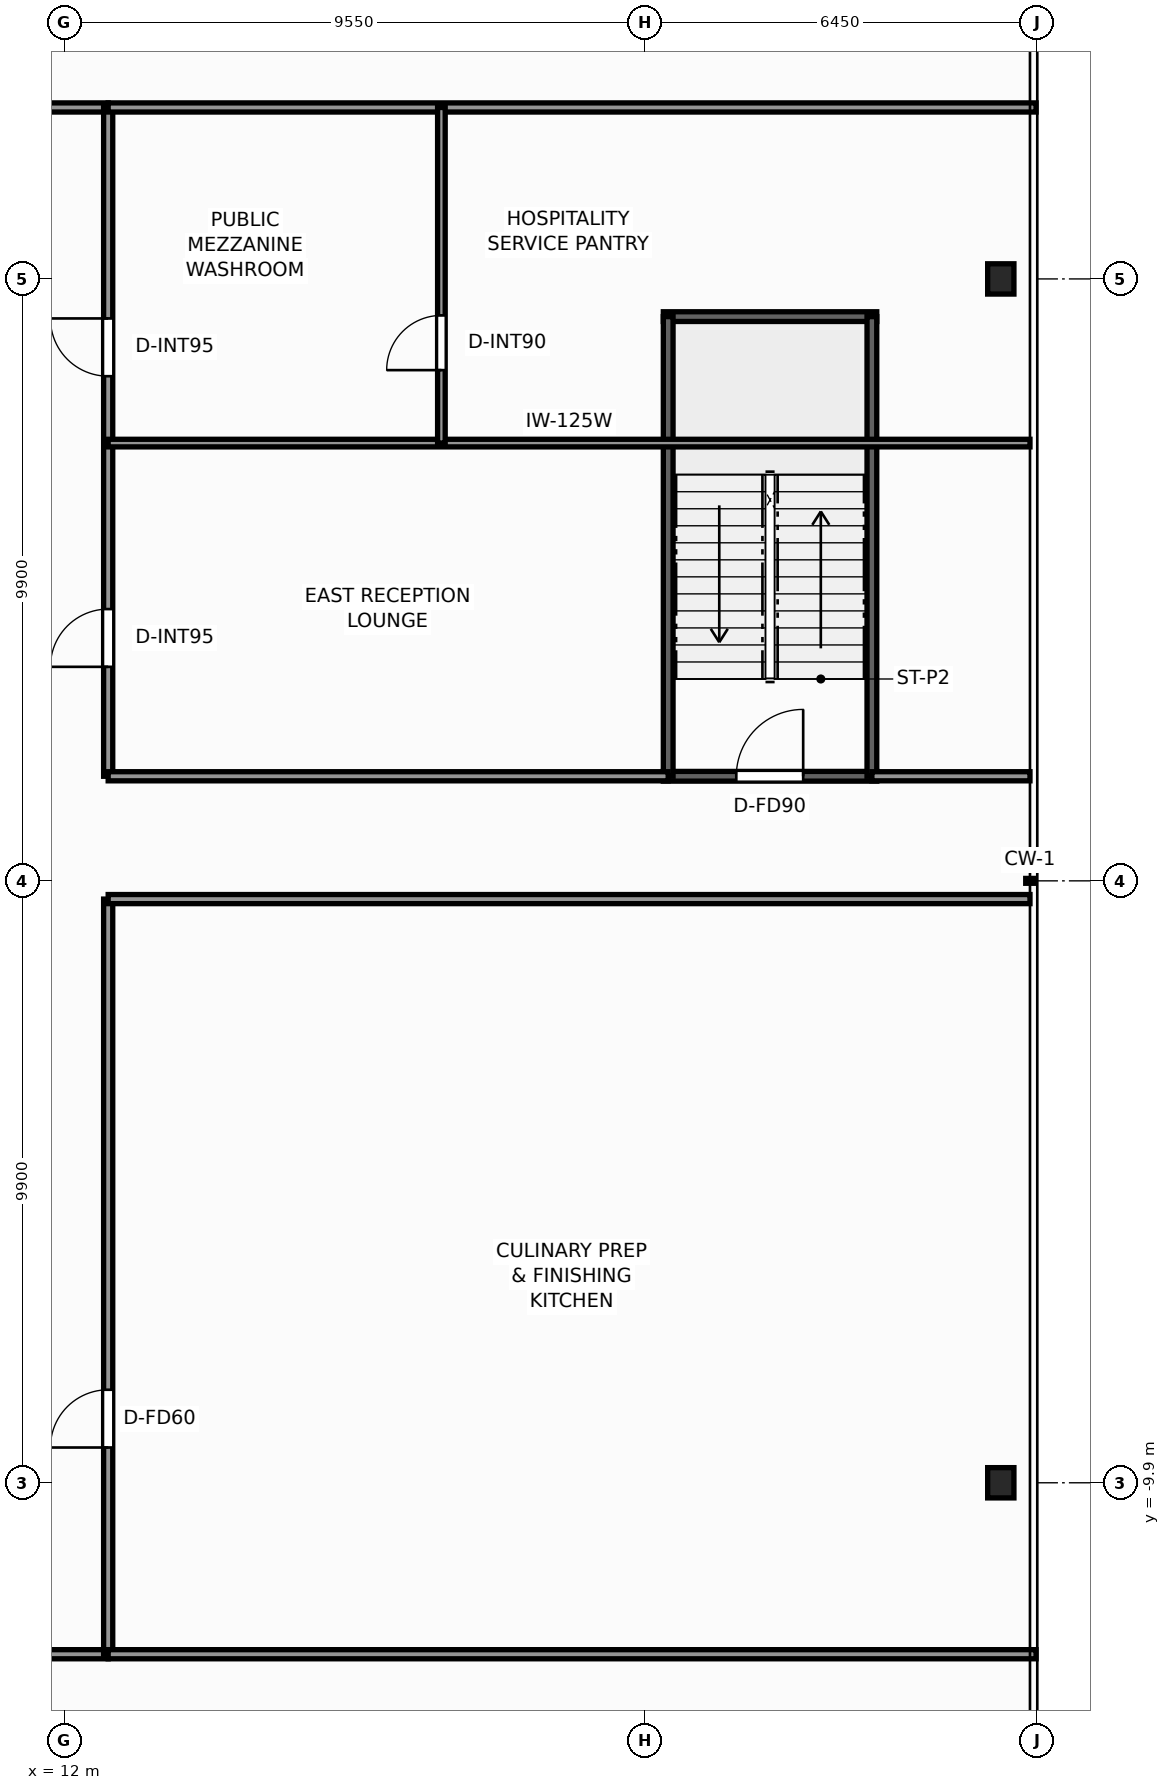
"""IFC4 building model, lengths in metres.
Left out: names, types, materials, properties, quantities, classifications, styles, units other than length and angle.
Written with IfcOpenShell. Run it as: python <this file> out.ifc"""

import sys

from ifc_helpers import new_model, si_unit, direction, frame, frame_2d, origin, origin_2d, place, context, subcontext, project, spatial, rectangle, i_section, extrude, element, fill, save


model = new_model("IFC4")
c1 = context("Model", 3, precision=1e-05, world=origin(), true_north=direction((0.0, 1.0)))
c2 = subcontext(c1, "Body", "Model", "MODEL_VIEW")
j1 = project(units=[si_unit("LENGTHUNIT", "METRE"), si_unit("PLANEANGLEUNIT", "RADIAN")], contexts=[c1])
p1 = place(None, origin())
s1 = spatial("IfcSite", under=j1, at=p1, CompositionType="ELEMENT")
p2 = place(p1, origin())
s2 = spatial("IfcBuilding", under=s1, at=p2, CompositionType="ELEMENT")
p3 = place(p2, frame((0.0, 0.0, 5.5)))
s3 = spatial("IfcBuildingStorey", under=s2, at=p3, CompositionType="ELEMENT", Elevation=5.5)
for number, where, z_axis, x_axis in (
    (1, (27.4, -9.9, 0.0), (0.0, 0.0, 1.0), (1.0, 0.0, 0.0)),
    (2, (27.4, 9.9, 0.0), (0.0, 0.0, 1.0), (1.0, 0.0, 0.0)),
):
    element("IfcColumn", number, at=place(p3, frame(where, z_axis=z_axis, x_axis=x_axis)), inside=s3, PredefinedType="COLUMN", context=c2, shape_type="SweptSolid", body=[
        extrude(i_section(OverallWidth=0.432, OverallDepth=0.498, WebThickness=0.056, FlangeThickness=0.089, FilletRadius=0.025, at=origin_2d()), origin(), (0.0, 0.0, 1.0), 4.5),
    ])
p4 = place(p3, frame((21.85, 1.72, 0.0), z_axis=(0.0, 0.0, 1.0), x_axis=(1.0, 0.0, 0.0)))
e3 = element("IfcWall", 3, at=p4, inside=s3, PredefinedType="SHEAR", context=c2, shape_type="SweptSolid", body=[
    extrude(rectangle(XDim=3.51, YDim=0.16, at=frame_2d((1.755, 0.0))), origin(), (0.0, 0.0, 1.0), 4.5),
])
p5 = place(p4, frame((1.2, 0.0, 0.0)))
e4 = element("IfcOpeningElement", 4, at=p5, cuts=e3, PredefinedType="OPENING", context=c2, shape_type="SweptSolid", body=[
    extrude(rectangle(XDim=1.1, YDim=2.2, at=frame_2d((0.55, 1.1))), frame((0.0, 0.09, 0.0), z_axis=(0.0, -1.0, 0.0), x_axis=(1.0, 0.0, 0.0)), (0.0, 0.0, 1.0), 0.18),
])
p6 = place(p3, frame((21.85, 9.28, 0.0), z_axis=(0.0, 0.0, 1.0), x_axis=(1.0, 0.0, 0.0)))
e5 = element("IfcWall", 5, at=p6, inside=s3, PredefinedType="SHEAR", context=c2, shape_type="SweptSolid", body=[
    extrude(rectangle(XDim=3.51, YDim=0.16, at=frame_2d((1.755, 0.0))), origin(), (0.0, 0.0, 1.0), 4.5),
])
for number, where, z_axis, x_axis in (
    (6, (21.93, 1.72, 0.0), (0.0, 0.0, 1.0), (0.0, 1.0, 0.0)),
    (7, (25.28, 1.72, 0.0), (0.0, 0.0, 1.0), (0.0, 1.0, 0.0)),
):
    element("IfcWall", number, at=place(p3, frame(where, z_axis=z_axis, x_axis=x_axis)), inside=s3, PredefinedType="SHEAR", context=c2, shape_type="SweptSolid", body=[
        extrude(rectangle(XDim=7.56, YDim=0.16, at=frame_2d((3.78, 0.0))), origin(), (0.0, 0.0, 1.0), 4.5),
    ])
p7 = place(p3, frame((-12.72, -12.72, 0.0), z_axis=(0.0, 0.0, 1.0), x_axis=(1.0, 0.0, 0.0)))
e8 = element("IfcWall", 8, at=p7, inside=s3, PredefinedType="PARTITIONING", context=c2, shape_type="SweptSolid", body=[
    extrude(rectangle(XDim=25.44, YDim=0.15, at=frame_2d((12.72, 0.0))), origin(), (0.0, 0.0, 1.0), 3.194),
])
p8 = place(p7, frame((3.6, 0.0, 0.0)))
e9 = element("IfcOpeningElement", 9, at=p8, cuts=e8, PredefinedType="OPENING", context=c2, shape_type="SweptSolid", body=[
    extrude(rectangle(XDim=1.6, YDim=2.3, at=frame_2d((0.8, 1.15))), frame((0.0, 0.085, 0.0), z_axis=(0.0, -1.0, 0.0), x_axis=(1.0, 0.0, 0.0)), (0.0, 0.0, 1.0), 0.17),
])
p9 = place(p7, frame((11.57, 0.0, 0.0)))
e10 = element("IfcOpeningElement", 10, at=p9, cuts=e8, PredefinedType="OPENING", context=c2, shape_type="SweptSolid", body=[
    extrude(rectangle(XDim=1.2, YDim=2.2, at=frame_2d((0.6, 1.1))), frame((0.0, 0.085, 0.0), z_axis=(0.0, -1.0, 0.0), x_axis=(1.0, 0.0, 0.0)), (0.0, 0.0, 1.0), 0.17),
])
p10 = place(p3, frame((-12.72, 12.72, 0.0), z_axis=(0.0, 0.0, 1.0), x_axis=(1.0, 0.0, 0.0)))
e11 = element("IfcWall", 11, at=p10, inside=s3, PredefinedType="PARTITIONING", context=c2, shape_type="SweptSolid", body=[
    extrude(rectangle(XDim=25.44, YDim=0.15, at=frame_2d((12.72, 0.0))), origin(), (0.0, 0.0, 1.0), 3.194),
])
p11 = place(p10, frame((1.8, 0.0, 0.0)))
e12 = element("IfcOpeningElement", 12, at=p11, cuts=e11, PredefinedType="OPENING", context=c2, shape_type="SweptSolid", body=[
    extrude(rectangle(XDim=0.95, YDim=2.06, at=frame_2d((0.475, 1.03))), frame((0.0, 0.085, 0.0), z_axis=(0.0, -1.0, 0.0), x_axis=(1.0, 0.0, 0.0)), (0.0, 0.0, 1.0), 0.17),
])
p12 = place(p10, frame((10.5, 0.0, 0.0)))
e13 = element("IfcOpeningElement", 13, at=p12, cuts=e11, PredefinedType="OPENING", context=c2, shape_type="SweptSolid", body=[
    extrude(rectangle(XDim=1.6, YDim=2.3, at=frame_2d((0.8, 1.15))), frame((0.0, 0.085, 0.0), z_axis=(0.0, -1.0, 0.0), x_axis=(1.0, 0.0, 0.0)), (0.0, 0.0, 1.0), 0.17),
])
p13 = place(p3, frame((12.72, -12.72, 0.0), z_axis=(0.0, 0.0, 1.0), x_axis=(0.0, 1.0, 0.0)))
e14 = element("IfcWall", 14, at=p13, inside=s3, PredefinedType="PARTITIONING", context=c2, shape_type="SweptSolid", body=[
    extrude(rectangle(XDim=12.42, YDim=0.15, at=frame_2d((6.21, 0.0))), origin(), (0.0, 0.0, 1.0), 3.194),
])
p14 = place(p13, frame((3.4, 0.0, 0.0)))
e15 = element("IfcOpeningElement", 15, at=p14, cuts=e14, PredefinedType="OPENING", context=c2, shape_type="SweptSolid", body=[
    extrude(rectangle(XDim=0.95, YDim=2.06, at=frame_2d((0.475, 1.03))), frame((0.0, 0.085, 0.0), z_axis=(0.0, -1.0, 0.0), x_axis=(1.0, 0.0, 0.0)), (0.0, 0.0, 1.0), 0.17),
])
p15 = place(p3, frame((12.72, 1.72, 0.0), z_axis=(0.0, 0.0, 1.0), x_axis=(0.0, 1.0, 0.0)))
e16 = element("IfcWall", 16, at=p15, inside=s3, PredefinedType="PARTITIONING", context=c2, shape_type="SweptSolid", body=[
    extrude(rectangle(XDim=11.0, YDim=0.15, at=frame_2d((5.5, 0.0))), origin(), (0.0, 0.0, 1.0), 3.194),
])
p16 = place(p15, frame((6.58, 0.0, 0.0)))
e17 = element("IfcOpeningElement", 17, at=p16, cuts=e16, PredefinedType="OPENING", context=c2, shape_type="SweptSolid", body=[
    extrude(rectangle(XDim=0.95, YDim=2.06, at=frame_2d((0.475, 1.03))), frame((0.0, 0.085, 0.0), z_axis=(0.0, -1.0, 0.0), x_axis=(1.0, 0.0, 0.0)), (0.0, 0.0, 1.0), 0.17),
])
p17 = place(p15, frame((1.8, 0.0, 0.0)))
e18 = element("IfcOpeningElement", 18, at=p17, cuts=e16, PredefinedType="OPENING", context=c2, shape_type="SweptSolid", body=[
    extrude(rectangle(XDim=0.95, YDim=2.06, at=frame_2d((0.475, 1.03))), frame((0.0, 0.085, 0.0), z_axis=(0.0, -1.0, 0.0), x_axis=(1.0, 0.0, 0.0)), (0.0, 0.0, 1.0), 0.17),
])
p18 = place(p3, frame((12.72, -0.3, 0.0), z_axis=(0.0, 0.0, 1.0), x_axis=(1.0, 0.0, 0.0)))
e19 = element("IfcWall", 19, at=p18, inside=s3, PredefinedType="PARTITIONING", context=c2, shape_type="SweptSolid", body=[
    extrude(rectangle(XDim=15.16, YDim=0.15, at=frame_2d((7.58, 0.0))), origin(), (0.0, 0.0, 1.0), 3.589),
])
p19 = place(p3, frame((12.72, 1.72, 0.0), z_axis=(0.0, 0.0, 1.0), x_axis=(1.0, 0.0, 0.0)))
e20 = element("IfcWall", 20, at=p19, inside=s3, PredefinedType="PARTITIONING", context=c2, shape_type="SweptSolid", body=[
    extrude(rectangle(XDim=9.21, YDim=0.15, at=frame_2d((4.605, 0.0))), origin(), (0.0, 0.0, 1.0), 4.22),
])
p20 = place(p3, frame((25.28, 1.72, 0.0), z_axis=(0.0, 0.0, 1.0), x_axis=(1.0, 0.0, 0.0)))
e21 = element("IfcWall", 21, at=p20, inside=s3, PredefinedType="PARTITIONING", context=c2, shape_type="SweptSolid", body=[
    extrude(rectangle(XDim=2.6, YDim=0.15, at=frame_2d((1.3, 0.0))), origin(), (0.0, 0.0, 1.0), 3.589),
])
for number, where, z_axis, x_axis in (
    (22, (12.72, -12.72, 0.0), (0.0, 0.0, 1.0), (1.0, 0.0, 0.0)),
    (23, (12.72, 12.72, 0.0), (0.0, 0.0, 1.0), (1.0, 0.0, 0.0)),
):
    element("IfcWall", number, at=place(p3, frame(where, z_axis=z_axis, x_axis=x_axis)), inside=s3, PredefinedType="PARTITIONING", context=c2, shape_type="SweptSolid", body=[
        extrude(rectangle(XDim=15.26, YDim=0.15, at=frame_2d((7.63, 0.0))), origin(), (0.0, 0.0, 1.0), 3.589),
    ])
p21 = place(p3, frame((12.72, 7.2, 0.0), z_axis=(0.0, 0.0, 1.0), x_axis=(1.0, 0.0, 0.0)))
e24 = element("IfcWall", 24, at=p21, inside=s3, PredefinedType="PARTITIONING", context=c2, shape_type="SweptSolid", body=[
    extrude(rectangle(XDim=15.16, YDim=0.125, at=frame_2d((7.58, 0.0))), origin(), (0.0, 0.0, 1.0), 3.589),
])
p22 = place(p3, frame((18.2, 7.2, 0.0), z_axis=(0.0, 0.0, 1.0), x_axis=(0.0, 1.0, 0.0)))
e25 = element("IfcWall", 25, at=p22, inside=s3, PredefinedType="PARTITIONING", context=c2, shape_type="SweptSolid", body=[
    extrude(rectangle(XDim=5.52, YDim=0.125, at=frame_2d((2.76, 0.0))), origin(), (0.0, 0.0, 1.0), 3.194),
])
p23 = place(p22, frame((1.2, 0.0, 0.0)))
e26 = element("IfcOpeningElement", 26, at=p23, cuts=e25, PredefinedType="OPENING", context=c2, shape_type="SweptSolid", body=[
    extrude(rectangle(XDim=0.9, YDim=2.06, at=frame_2d((0.45, 1.03))), frame((0.0, 0.073, 0.0), z_axis=(0.0, -1.0, 0.0), x_axis=(1.0, 0.0, 0.0)), (0.0, 0.0, 1.0), 0.145),
])
p24 = place(p5, origin())
e27 = element("IfcDoor", 27, at=p24, inside=s3, OperationType="SINGLE_SWING_RIGHT", PredefinedType="DOOR", context=c2, shape_type="SweptSolid", body=[
    extrude(rectangle(XDim=1.1, YDim=2.2, at=frame_2d((0.55, 1.1))), frame((0.0, 0.025, 0.0), z_axis=(0.0, -1.0, 0.0), x_axis=(1.0, 0.0, 0.0)), (0.0, 0.0, 1.0), 0.05),
])
fill(e4, e27)
p25 = place(p14, origin())
e28 = element("IfcDoor", 28, at=p25, inside=s3, OperationType="SINGLE_SWING_LEFT", PredefinedType="DOOR", context=c2, shape_type="SweptSolid", body=[
    extrude(rectangle(XDim=0.95, YDim=2.06, at=frame_2d((0.475, 1.03))), frame((0.0, 0.025, 0.0), z_axis=(0.0, -1.0, 0.0), x_axis=(1.0, 0.0, 0.0)), (0.0, 0.0, 1.0), 0.05),
])
fill(e15, e28)
p26 = place(p16, origin())
e29 = element("IfcDoor", 29, at=p26, inside=s3, OperationType="SINGLE_SWING_RIGHT", PredefinedType="DOOR", context=c2, shape_type="SweptSolid", body=[
    extrude(rectangle(XDim=0.95, YDim=2.06, at=frame_2d((0.475, 1.03))), frame((0.0, 0.025, 0.0), z_axis=(0.0, -1.0, 0.0), x_axis=(1.0, 0.0, 0.0)), (0.0, 0.0, 1.0), 0.05),
])
fill(e17, e29)
p27 = place(p23, origin())
e30 = element("IfcDoor", 30, at=p27, inside=s3, OperationType="SINGLE_SWING_LEFT", PredefinedType="DOOR", context=c2, shape_type="SweptSolid", body=[
    extrude(rectangle(XDim=0.9, YDim=2.06, at=frame_2d((0.45, 1.03))), frame((0.0, 0.025, 0.0), z_axis=(0.0, -1.0, 0.0), x_axis=(1.0, 0.0, 0.0)), (0.0, 0.0, 1.0), 0.05),
])
fill(e26, e30)
p28 = place(p17, origin())
e31 = element("IfcDoor", 31, at=p28, inside=s3, OperationType="SINGLE_SWING_LEFT", PredefinedType="DOOR", context=c2, shape_type="SweptSolid", body=[
    extrude(rectangle(XDim=0.95, YDim=2.06, at=frame_2d((0.475, 1.03))), frame((0.0, 0.025, 0.0), z_axis=(0.0, -1.0, 0.0), x_axis=(1.0, 0.0, 0.0)), (0.0, 0.0, 1.0), 0.05),
])
fill(e18, e31)
save(model, sys.argv[1])
